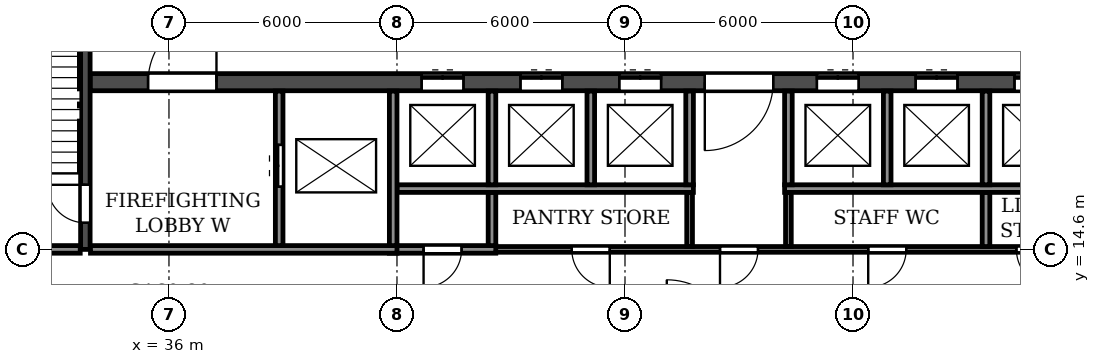
"""IFC4 building model, lengths in metres.
Left out: names, types, materials, properties, quantities, classifications, styles, units other than length and angle.
Written with IfcOpenShell. Run it as: python <this file> out.ifc"""

import sys

from ifc_helpers import new_model, si_unit, direction, frame, frame_2d, origin, place, context, subcontext, project, spatial, rectangle, extrude, element, fill, save


model = new_model("IFC4")
c1 = context("Model", 3, precision=1e-05, world=origin(), true_north=direction((0.0, 1.0)))
c2 = subcontext(c1, "Body", "Model", "MODEL_VIEW")
j1 = project(units=[si_unit("LENGTHUNIT", "METRE"), si_unit("PLANEANGLEUNIT", "RADIAN")], contexts=[c1])
p1 = place(None, origin())
s1 = spatial("IfcSite", under=j1, at=p1, CompositionType="ELEMENT")
p2 = place(p1, origin())
s2 = spatial("IfcBuilding", under=s1, at=p2, CompositionType="ELEMENT")
p3 = place(p2, origin())
s3 = spatial("IfcBuildingStorey", under=s2, at=p3, CompositionType="ELEMENT", Elevation=0.0)
p4 = place(p3, frame((33.925, 19.0, 0.0), z_axis=(0.0, 0.0, 1.0), x_axis=(1.0, 0.0, 0.0)))
e1 = element("IfcWall", 1, at=p4, inside=s3, PredefinedType="SOLIDWALL", context=c2, shape_type="SweptSolid", body=[
    extrude(rectangle(XDim=34.15, YDim=0.45, at=frame_2d((17.075, 0.0))), origin(), (0.0, 0.0, 1.0), 4.2),
])
p5 = place(p4, frame((16.175, 0.0, 0.0)))
e2 = element("IfcOpeningElement", 2, at=p5, cuts=e1, PredefinedType="OPENING", context=c2, shape_type="SweptSolid", body=[
    extrude(rectangle(XDim=1.8, YDim=2.1, at=frame_2d((0.9, 1.05))), frame((0.0, 0.235, 0.0), z_axis=(0.0, -1.0, 0.0), x_axis=(1.0, 0.0, 0.0)), (0.0, 0.0, 1.0), 0.47),
])
p6 = place(p4, frame((1.525, 0.0, 0.0)))
e3 = element("IfcOpeningElement", 3, at=p6, cuts=e1, PredefinedType="OPENING", context=c2, shape_type="SweptSolid", body=[
    extrude(rectangle(XDim=1.8, YDim=2.1, at=frame_2d((0.9, 1.05))), frame((0.0, 0.235, 0.0), z_axis=(0.0, -1.0, 0.0), x_axis=(1.0, 0.0, 0.0)), (0.0, 0.0, 1.0), 0.47),
])
p7 = place(p4, frame((8.725, 0.0, 0.0)))
e4 = element("IfcOpeningElement", 4, at=p7, cuts=e1, PredefinedType="OPENING", context=c2, shape_type="SweptSolid", body=[
    extrude(rectangle(XDim=1.1, YDim=2.1, at=frame_2d((0.55, 1.05))), frame((0.0, 0.235, 0.0), z_axis=(0.0, -1.0, 0.0), x_axis=(1.0, 0.0, 0.0)), (0.0, 0.0, 1.0), 0.47),
])
p8 = place(p4, frame((11.325, 0.0, 0.0)))
e5 = element("IfcOpeningElement", 5, at=p8, cuts=e1, PredefinedType="OPENING", context=c2, shape_type="SweptSolid", body=[
    extrude(rectangle(XDim=1.1, YDim=2.1, at=frame_2d((0.55, 1.05))), frame((0.0, 0.235, 0.0), z_axis=(0.0, -1.0, 0.0), x_axis=(1.0, 0.0, 0.0)), (0.0, 0.0, 1.0), 0.47),
])
p9 = place(p4, frame((13.925, 0.0, 0.0)))
e6 = element("IfcOpeningElement", 6, at=p9, cuts=e1, PredefinedType="OPENING", context=c2, shape_type="SweptSolid", body=[
    extrude(rectangle(XDim=1.1, YDim=2.1, at=frame_2d((0.55, 1.05))), frame((0.0, 0.235, 0.0), z_axis=(0.0, -1.0, 0.0), x_axis=(1.0, 0.0, 0.0)), (0.0, 0.0, 1.0), 0.47),
])
p10 = place(p4, frame((19.125, 0.0, 0.0)))
e7 = element("IfcOpeningElement", 7, at=p10, cuts=e1, PredefinedType="OPENING", context=c2, shape_type="SweptSolid", body=[
    extrude(rectangle(XDim=1.1, YDim=2.1, at=frame_2d((0.55, 1.05))), frame((0.0, 0.235, 0.0), z_axis=(0.0, -1.0, 0.0), x_axis=(1.0, 0.0, 0.0)), (0.0, 0.0, 1.0), 0.47),
])
p11 = place(p4, frame((21.725, 0.0, 0.0)))
e8 = element("IfcOpeningElement", 8, at=p11, cuts=e1, PredefinedType="OPENING", context=c2, shape_type="SweptSolid", body=[
    extrude(rectangle(XDim=1.1, YDim=2.1, at=frame_2d((0.55, 1.05))), frame((0.0, 0.235, 0.0), z_axis=(0.0, -1.0, 0.0), x_axis=(1.0, 0.0, 0.0)), (0.0, 0.0, 1.0), 0.47),
])
p12 = place(p4, frame((24.325, 0.0, 0.0)))
e9 = element("IfcOpeningElement", 9, at=p12, cuts=e1, PredefinedType="OPENING", context=c2, shape_type="SweptSolid", body=[
    extrude(rectangle(XDim=1.1, YDim=2.1, at=frame_2d((0.55, 1.05))), frame((0.0, 0.235, 0.0), z_axis=(0.0, -1.0, 0.0), x_axis=(1.0, 0.0, 0.0)), (0.0, 0.0, 1.0), 0.47),
])
p13 = place(p4, frame((30.825, 0.0, 0.0)))
e10 = element("IfcOpeningElement", 10, at=p13, cuts=e1, PredefinedType="OPENING", context=c2, shape_type="SweptSolid", body=[
    extrude(rectangle(XDim=1.8, YDim=2.1, at=frame_2d((0.9, 1.05))), frame((0.0, 0.235, 0.0), z_axis=(0.0, -1.0, 0.0), x_axis=(1.0, 0.0, 0.0)), (0.0, 0.0, 1.0), 0.47),
])
p14 = place(p3, frame((33.8, 14.6, 0.0), z_axis=(0.0, 0.0, 1.0), x_axis=(0.0, 1.0, 0.0)))
e11 = element("IfcWall", 11, at=p14, inside=s3, PredefinedType="SOLIDWALL", context=c2, shape_type="SweptSolid", body=[
    extrude(rectangle(XDim=7.875, YDim=0.25, at=frame_2d((3.938, 0.0))), origin(), (0.0, 0.0, 1.0), 4.2),
])
p15 = place(p14, frame((0.7, 0.0, 0.0)))
e12 = element("IfcOpeningElement", 12, at=p15, cuts=e11, PredefinedType="OPENING", context=c2, shape_type="SweptSolid", body=[
    extrude(rectangle(XDim=1.0, YDim=2.1, at=frame_2d((0.5, 1.05))), frame((0.0, 0.135, 0.0), z_axis=(0.0, -1.0, 0.0), x_axis=(1.0, 0.0, 0.0)), (0.0, 0.0, 1.0), 0.27),
])
p16 = place(p3, frame((44.4, 14.6, 0.0), z_axis=(0.0, 0.0, 1.0), x_axis=(1.0, 0.0, 0.0)))
e13 = element("IfcWall", 13, at=p16, inside=s3, PredefinedType="PARTITIONING", context=c2, shape_type="SweptSolid", body=[
    extrude(rectangle(XDim=15.8, YDim=0.15, at=frame_2d((7.9, 0.0))), origin(), (0.0, 0.0, 1.0), 4.2),
])
p17 = place(p16, frame((2.2, 0.0, 0.0)))
e14 = element("IfcOpeningElement", 14, at=p17, cuts=e13, PredefinedType="OPENING", context=c2, shape_type="SweptSolid", body=[
    extrude(rectangle(XDim=1.0, YDim=2.1, at=frame_2d((0.5, 1.05))), frame((0.0, 0.085, 0.0), z_axis=(0.0, -1.0, 0.0), x_axis=(1.0, 0.0, 0.0)), (0.0, 0.0, 1.0), 0.17),
])
p18 = place(p16, frame((6.1, 0.0, 0.0)))
e15 = element("IfcOpeningElement", 15, at=p18, cuts=e13, PredefinedType="OPENING", context=c2, shape_type="SweptSolid", body=[
    extrude(rectangle(XDim=1.0, YDim=2.1, at=frame_2d((0.5, 1.05))), frame((0.0, 0.085, 0.0), z_axis=(0.0, -1.0, 0.0), x_axis=(1.0, 0.0, 0.0)), (0.0, 0.0, 1.0), 0.17),
])
p19 = place(p16, frame((10.0, 0.0, 0.0)))
e16 = element("IfcOpeningElement", 16, at=p19, cuts=e13, PredefinedType="OPENING", context=c2, shape_type="SweptSolid", body=[
    extrude(rectangle(XDim=1.0, YDim=2.1, at=frame_2d((0.5, 1.05))), frame((0.0, 0.085, 0.0), z_axis=(0.0, -1.0, 0.0), x_axis=(1.0, 0.0, 0.0)), (0.0, 0.0, 1.0), 0.17),
])
p20 = place(p16, frame((13.9, 0.0, 0.0)))
e17 = element("IfcOpeningElement", 17, at=p20, cuts=e13, PredefinedType="OPENING", context=c2, shape_type="SweptSolid", body=[
    extrude(rectangle(XDim=1.0, YDim=2.1, at=frame_2d((0.5, 1.05))), frame((0.0, 0.085, 0.0), z_axis=(0.0, -1.0, 0.0), x_axis=(1.0, 0.0, 0.0)), (0.0, 0.0, 1.0), 0.17),
])
for number, where, z_axis, x_axis in (
    (18, (49.7, 14.675, 0.0), (0.0, 0.0, 1.0), (0.0, 1.0, 0.0)),
    (19, (52.3, 14.675, 0.0), (0.0, 0.0, 1.0), (0.0, 1.0, 0.0)),
):
    element("IfcWall", number, at=place(p3, frame(where, z_axis=z_axis, x_axis=x_axis)), inside=s3, PredefinedType="PARTITIONING", context=c2, shape_type="SweptSolid", body=[
        extrude(rectangle(XDim=1.425, YDim=0.15, at=frame_2d((0.712, 0.0))), origin(), (0.0, 0.0, 1.0), 4.2),
    ])
p21 = place(p3, frame((41.8, 14.6, 0.0), z_axis=(0.0, 0.0, 1.0), x_axis=(1.0, 0.0, 0.0)))
e20 = element("IfcWall", 20, at=p21, inside=s3, PredefinedType="PARTITIONING", context=c2, shape_type="SweptSolid", body=[
    extrude(rectangle(XDim=2.8, YDim=0.2, at=frame_2d((1.4, 0.0))), origin(), (0.0, 0.0, 1.0), 4.2),
])
p22 = place(p21, frame((0.9, 0.0, 0.0)))
e21 = element("IfcOpeningElement", 21, at=p22, cuts=e20, PredefinedType="OPENING", context=c2, shape_type="SweptSolid", body=[
    extrude(rectangle(XDim=1.0, YDim=2.1, at=frame_2d((0.5, 1.05))), frame((0.0, 0.11, 0.0), z_axis=(0.0, -1.0, 0.0), x_axis=(1.0, 0.0, 0.0)), (0.0, 0.0, 1.0), 0.22),
])
p23 = place(p3, frame((44.5, 14.7, 0.0), z_axis=(0.0, 0.0, 1.0), x_axis=(0.0, 1.0, 0.0)))
e22 = element("IfcWall", 22, at=p23, inside=s3, PredefinedType="PARTITIONING", context=c2, shape_type="SweptSolid", body=[
    extrude(rectangle(XDim=1.4, YDim=0.2, at=frame_2d((0.7, 0.0))), origin(), (0.0, 0.0, 1.0), 4.2),
])
p24 = place(p3, frame((57.5, 14.675, 0.0), z_axis=(0.0, 0.0, 1.0), x_axis=(0.0, 1.0, 0.0)))
e23 = element("IfcWall", 23, at=p24, inside=s3, PredefinedType="PARTITIONING", context=c2, shape_type="SweptSolid", body=[
    extrude(rectangle(XDim=1.425, YDim=0.2, at=frame_2d((0.712, 0.0))), origin(), (0.0, 0.0, 1.0), 4.2),
])
p25 = place(p3, frame((33.935, 14.6, 0.0), z_axis=(0.0, 0.0, 1.0), x_axis=(1.0, 0.0, 0.0)))
e24 = element("IfcWall", 24, at=p25, inside=s3, PredefinedType="PARTITIONING", context=c2, shape_type="SweptSolid", body=[
    extrude(rectangle(XDim=8.065, YDim=0.2, at=frame_2d((4.032, 0.0))), origin(), (0.0, 0.0, 1.0), 4.2),
])
for number, where, z_axis, x_axis in (
    (25, (42.0, 16.2, 0.0), (0.0, 0.0, 1.0), (1.0, 0.0, 0.0)),
    (26, (52.2, 16.2, 0.0), (0.0, 0.0, 1.0), (1.0, 0.0, 0.0)),
):
    element("IfcWall", number, at=place(p3, frame(where, z_axis=z_axis, x_axis=x_axis)), inside=s3, PredefinedType="PARTITIONING", context=c2, shape_type="SweptSolid", body=[
        extrude(rectangle(XDim=7.8, YDim=0.2, at=frame_2d((3.9, 0.0))), origin(), (0.0, 0.0, 1.0), 4.2),
    ])
p26 = place(p3, frame((38.9, 14.7, 0.0), z_axis=(0.0, 0.0, 1.0), x_axis=(0.0, 1.0, 0.0)))
e27 = element("IfcWall", 27, at=p26, inside=s3, PredefinedType="PARTITIONING", context=c2, shape_type="SweptSolid", body=[
    extrude(rectangle(XDim=4.065, YDim=0.2, at=frame_2d((2.032, 0.0))), origin(), (0.0, 0.0, 1.0), 4.2),
])
p27 = place(p26, frame((1.55, 0.0, 0.0)))
e28 = element("IfcOpeningElement", 28, at=p27, cuts=e27, PredefinedType="OPENING", context=c2, shape_type="SweptSolid", body=[
    extrude(rectangle(XDim=1.1, YDim=2.1, at=frame_2d((0.55, 1.05))), frame((0.0, 0.11, 0.0), z_axis=(0.0, -1.0, 0.0), x_axis=(1.0, 0.0, 0.0)), (0.0, 0.0, 1.0), 0.22),
])
p28 = place(p3, frame((41.9, 14.7, 0.0), z_axis=(0.0, 0.0, 1.0), x_axis=(0.0, 1.0, 0.0)))
e29 = element("IfcWall", 29, at=p28, inside=s3, PredefinedType="PARTITIONING", context=c2, shape_type="SweptSolid", body=[
    extrude(rectangle(XDim=4.065, YDim=0.2, at=frame_2d((2.032, 0.0))), origin(), (0.0, 0.0, 1.0), 4.2),
])
for number, where, z_axis, x_axis in (
    (30, (44.5, 16.3, 0.0), (0.0, 0.0, 1.0), (0.0, 1.0, 0.0)),
    (31, (47.1, 16.3, 0.0), (0.0, 0.0, 1.0), (0.0, 1.0, 0.0)),
    (32, (49.7, 16.3, 0.0), (0.0, 0.0, 1.0), (0.0, 1.0, 0.0)),
    (33, (52.3, 16.3, 0.0), (0.0, 0.0, 1.0), (0.0, 1.0, 0.0)),
    (34, (54.9, 16.3, 0.0), (0.0, 0.0, 1.0), (0.0, 1.0, 0.0)),
    (35, (57.5, 16.3, 0.0), (0.0, 0.0, 1.0), (0.0, 1.0, 0.0)),
):
    element("IfcWall", number, at=place(p3, frame(where, z_axis=z_axis, x_axis=x_axis)), inside=s3, PredefinedType="PARTITIONING", context=c2, shape_type="SweptSolid", body=[
        extrude(rectangle(XDim=2.465, YDim=0.2, at=frame_2d((1.232, 0.0))), origin(), (0.0, 0.0, 1.0), 4.2),
    ])
p29 = place(p3, frame((30.135, 14.6, 0.0), z_axis=(0.0, 0.0, 1.0), x_axis=(1.0, 0.0, 0.0)))
e36 = element("IfcWall", 36, at=p29, inside=s3, PredefinedType="PARTITIONING", context=c2, shape_type="SweptSolid", body=[
    extrude(rectangle(XDim=3.53, YDim=0.2, at=frame_2d((1.765, 0.0))), origin(), (0.0, 0.0, 1.0), 4.2),
])
p30 = place(p29, frame((1.265, 0.0, 0.0)))
e37 = element("IfcOpeningElement", 37, at=p30, cuts=e36, PredefinedType="OPENING", context=c2, shape_type="SweptSolid", body=[
    extrude(rectangle(XDim=1.0, YDim=2.1, at=frame_2d((0.5, 1.05))), frame((0.0, 0.11, 0.0), z_axis=(0.0, -1.0, 0.0), x_axis=(1.0, 0.0, 0.0)), (0.0, 0.0, 1.0), 0.22),
])
p31 = place(p22, frame((1.0, 0.0, 0.0), z_axis=(0.0, 0.0, 1.0), x_axis=(-1.0, 0.0, 0.0)))
e38 = element("IfcDoor", 38, at=p31, inside=s3, OperationType="SINGLE_SWING_RIGHT", PredefinedType="DOOR", context=c2, shape_type="SweptSolid", body=[
    extrude(rectangle(XDim=1.0, YDim=2.1, at=frame_2d((0.5, 1.05))), frame((0.0, 0.025, 0.0), z_axis=(0.0, -1.0, 0.0), x_axis=(1.0, 0.0, 0.0)), (0.0, 0.0, 1.0), 0.05),
])
fill(e21, e38)
p32 = place(p17, frame((1.0, 0.0, 0.0), z_axis=(0.0, 0.0, 1.0), x_axis=(-1.0, 0.0, 0.0)))
e39 = element("IfcDoor", 39, at=p32, inside=s3, OperationType="SINGLE_SWING_LEFT", PredefinedType="DOOR", context=c2, shape_type="SweptSolid", body=[
    extrude(rectangle(XDim=1.0, YDim=2.1, at=frame_2d((0.5, 1.05))), frame((0.0, 0.025, 0.0), z_axis=(0.0, -1.0, 0.0), x_axis=(1.0, 0.0, 0.0)), (0.0, 0.0, 1.0), 0.05),
])
fill(e14, e39)
p33 = place(p18, frame((1.0, 0.0, 0.0), z_axis=(0.0, 0.0, 1.0), x_axis=(-1.0, 0.0, 0.0)))
e40 = element("IfcDoor", 40, at=p33, inside=s3, OperationType="SINGLE_SWING_RIGHT", PredefinedType="DOOR", context=c2, shape_type="SweptSolid", body=[
    extrude(rectangle(XDim=1.0, YDim=2.1, at=frame_2d((0.5, 1.05))), frame((0.0, 0.025, 0.0), z_axis=(0.0, -1.0, 0.0), x_axis=(1.0, 0.0, 0.0)), (0.0, 0.0, 1.0), 0.05),
])
fill(e15, e40)
p34 = place(p19, frame((1.0, 0.0, 0.0), z_axis=(0.0, 0.0, 1.0), x_axis=(-1.0, 0.0, 0.0)))
e41 = element("IfcDoor", 41, at=p34, inside=s3, OperationType="SINGLE_SWING_RIGHT", PredefinedType="DOOR", context=c2, shape_type="SweptSolid", body=[
    extrude(rectangle(XDim=1.0, YDim=2.1, at=frame_2d((0.5, 1.05))), frame((0.0, 0.025, 0.0), z_axis=(0.0, -1.0, 0.0), x_axis=(1.0, 0.0, 0.0)), (0.0, 0.0, 1.0), 0.05),
])
fill(e16, e41)
p35 = place(p20, frame((1.0, 0.0, 0.0), z_axis=(0.0, 0.0, 1.0), x_axis=(-1.0, 0.0, 0.0)))
e42 = element("IfcDoor", 42, at=p35, inside=s3, OperationType="SINGLE_SWING_LEFT", PredefinedType="DOOR", context=c2, shape_type="SweptSolid", body=[
    extrude(rectangle(XDim=1.0, YDim=2.1, at=frame_2d((0.5, 1.05))), frame((0.0, 0.025, 0.0), z_axis=(0.0, -1.0, 0.0), x_axis=(1.0, 0.0, 0.0)), (0.0, 0.0, 1.0), 0.05),
])
fill(e17, e42)
p36 = place(p15, origin())
e43 = element("IfcDoor", 43, at=p36, inside=s3, OperationType="SINGLE_SWING_RIGHT", PredefinedType="DOOR", context=c2, shape_type="SweptSolid", body=[
    extrude(rectangle(XDim=1.0, YDim=2.1, at=frame_2d((0.5, 1.05))), frame((0.0, 0.025, 0.0), z_axis=(0.0, -1.0, 0.0), x_axis=(1.0, 0.0, 0.0)), (0.0, 0.0, 1.0), 0.05),
])
fill(e12, e43)
p37 = place(p27, origin())
e44 = element("IfcDoor", 44, at=p37, inside=s3, OperationType="DOUBLE_DOOR_SLIDING", PredefinedType="DOOR", context=c2, shape_type="SweptSolid", body=[
    extrude(rectangle(XDim=1.1, YDim=2.1, at=frame_2d((0.55, 1.05))), frame((0.0, 0.025, 0.0), z_axis=(0.0, -1.0, 0.0), x_axis=(1.0, 0.0, 0.0)), (0.0, 0.0, 1.0), 0.05),
])
fill(e28, e44)
p38 = place(p5, frame((1.8, 0.0, 0.0), z_axis=(0.0, 0.0, 1.0), x_axis=(-1.0, 0.0, 0.0)))
e45 = element("IfcDoor", 45, at=p38, inside=s3, OperationType="DOUBLE_DOOR_SINGLE_SWING", PredefinedType="DOOR", context=c2, shape_type="SweptSolid", body=[
    extrude(rectangle(XDim=1.8, YDim=2.1, at=frame_2d((0.9, 1.05))), frame((0.0, 0.025, 0.0), z_axis=(0.0, -1.0, 0.0), x_axis=(1.0, 0.0, 0.0)), (0.0, 0.0, 1.0), 0.05),
])
fill(e2, e45)
p39 = place(p6, origin())
e46 = element("IfcDoor", 46, at=p39, inside=s3, OperationType="DOUBLE_DOOR_SINGLE_SWING", PredefinedType="DOOR", context=c2, shape_type="SweptSolid", body=[
    extrude(rectangle(XDim=1.8, YDim=2.1, at=frame_2d((0.9, 1.05))), frame((0.0, 0.025, 0.0), z_axis=(0.0, -1.0, 0.0), x_axis=(1.0, 0.0, 0.0)), (0.0, 0.0, 1.0), 0.05),
])
fill(e3, e46)
p40 = place(p7, origin())
e47 = element("IfcDoor", 47, at=p40, inside=s3, OperationType="DOUBLE_DOOR_SLIDING", PredefinedType="DOOR", context=c2, shape_type="SweptSolid", body=[
    extrude(rectangle(XDim=1.1, YDim=2.1, at=frame_2d((0.55, 1.05))), frame((0.0, 0.025, 0.0), z_axis=(0.0, -1.0, 0.0), x_axis=(1.0, 0.0, 0.0)), (0.0, 0.0, 1.0), 0.05),
])
fill(e4, e47)
p41 = place(p8, origin())
e48 = element("IfcDoor", 48, at=p41, inside=s3, OperationType="DOUBLE_DOOR_SLIDING", PredefinedType="DOOR", context=c2, shape_type="SweptSolid", body=[
    extrude(rectangle(XDim=1.1, YDim=2.1, at=frame_2d((0.55, 1.05))), frame((0.0, 0.025, 0.0), z_axis=(0.0, -1.0, 0.0), x_axis=(1.0, 0.0, 0.0)), (0.0, 0.0, 1.0), 0.05),
])
fill(e5, e48)
p42 = place(p9, origin())
e49 = element("IfcDoor", 49, at=p42, inside=s3, OperationType="DOUBLE_DOOR_SLIDING", PredefinedType="DOOR", context=c2, shape_type="SweptSolid", body=[
    extrude(rectangle(XDim=1.1, YDim=2.1, at=frame_2d((0.55, 1.05))), frame((0.0, 0.025, 0.0), z_axis=(0.0, -1.0, 0.0), x_axis=(1.0, 0.0, 0.0)), (0.0, 0.0, 1.0), 0.05),
])
fill(e6, e49)
p43 = place(p10, origin())
e50 = element("IfcDoor", 50, at=p43, inside=s3, OperationType="DOUBLE_DOOR_SLIDING", PredefinedType="DOOR", context=c2, shape_type="SweptSolid", body=[
    extrude(rectangle(XDim=1.1, YDim=2.1, at=frame_2d((0.55, 1.05))), frame((0.0, 0.025, 0.0), z_axis=(0.0, -1.0, 0.0), x_axis=(1.0, 0.0, 0.0)), (0.0, 0.0, 1.0), 0.05),
])
fill(e7, e50)
p44 = place(p11, origin())
e51 = element("IfcDoor", 51, at=p44, inside=s3, OperationType="DOUBLE_DOOR_SLIDING", PredefinedType="DOOR", context=c2, shape_type="SweptSolid", body=[
    extrude(rectangle(XDim=1.1, YDim=2.1, at=frame_2d((0.55, 1.05))), frame((0.0, 0.025, 0.0), z_axis=(0.0, -1.0, 0.0), x_axis=(1.0, 0.0, 0.0)), (0.0, 0.0, 1.0), 0.05),
])
fill(e8, e51)
p45 = place(p12, origin())
e52 = element("IfcDoor", 52, at=p45, inside=s3, OperationType="DOUBLE_DOOR_SLIDING", PredefinedType="DOOR", context=c2, shape_type="SweptSolid", body=[
    extrude(rectangle(XDim=1.1, YDim=2.1, at=frame_2d((0.55, 1.05))), frame((0.0, 0.025, 0.0), z_axis=(0.0, -1.0, 0.0), x_axis=(1.0, 0.0, 0.0)), (0.0, 0.0, 1.0), 0.05),
])
fill(e9, e52)
save(model, sys.argv[1])
